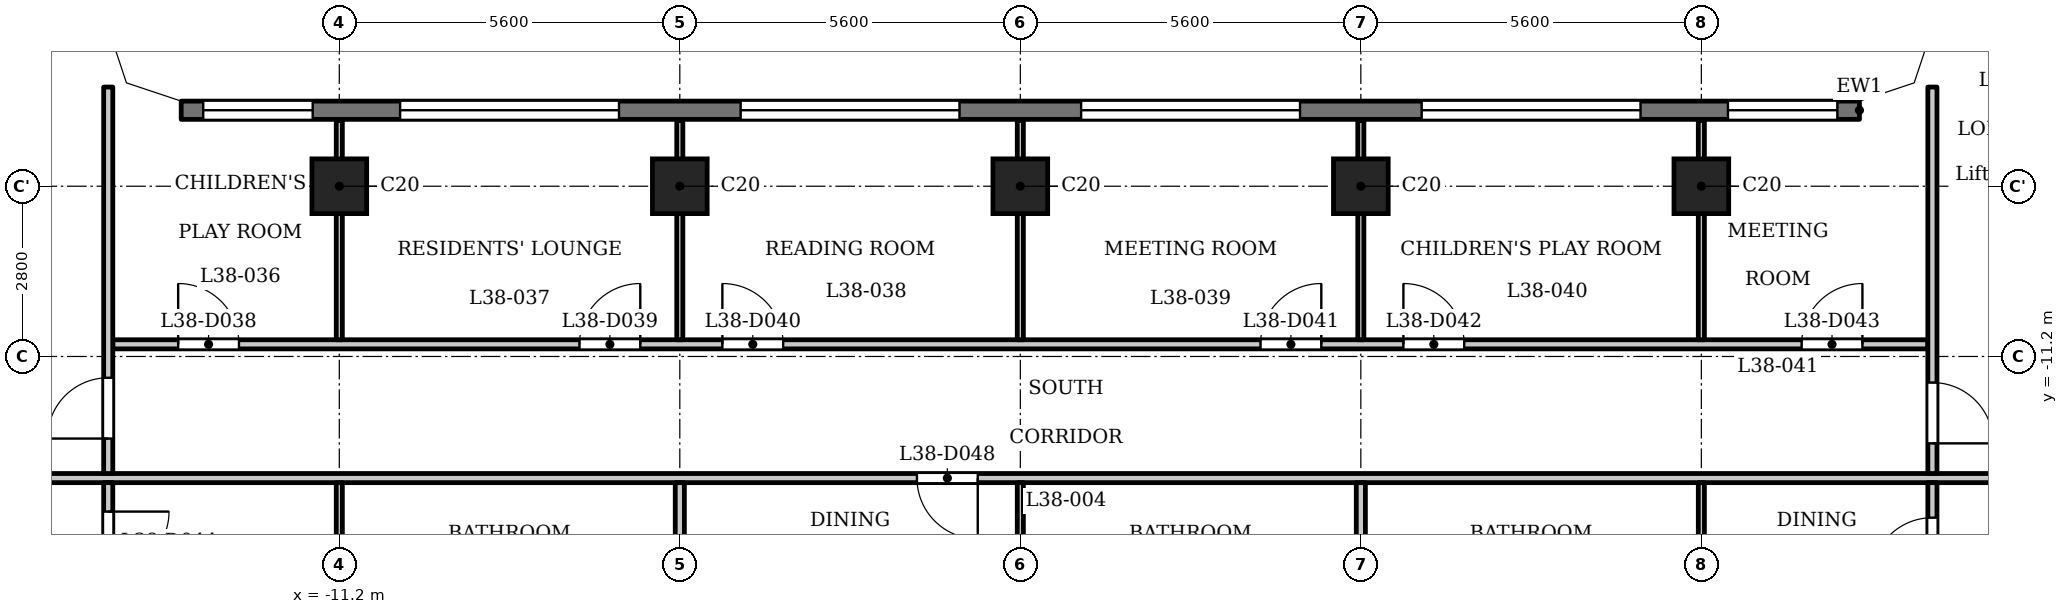
"""IFC4 building model, lengths in metres.
Left out: names, types, materials, properties, quantities, classifications, styles, units other than length and angle.
Written with IfcOpenShell. Run it as: python <this file> out.ifc"""

import sys

from ifc_helpers import new_model, si_unit, direction, frame, frame_2d, origin, origin_2d, place, context, subcontext, project, spatial, polyline, rectangle, outline, extrude, element, fill, save


model = new_model("IFC4")
c1 = context("Model", 3, precision=1e-05, world=origin(), true_north=direction((0.0, 1.0)))
c2 = subcontext(c1, "Body", "Model", "MODEL_VIEW")
j1 = project(units=[si_unit("LENGTHUNIT", "METRE"), si_unit("PLANEANGLEUNIT", "RADIAN")], contexts=[c1])
p1 = place(None, origin())
s1 = spatial("IfcSite", under=j1, at=p1, CompositionType="ELEMENT")
p2 = place(p1, origin())
s2 = spatial("IfcBuilding", under=s1, at=p2, CompositionType="ELEMENT")
p3 = place(p2, frame((0.0, 0.0, 150.1)))
s3 = spatial("IfcBuildingStorey", under=s2, at=p3, CompositionType="ELEMENT", Elevation=150.1)
for number, where, z_axis, x_axis in (
    (1, (-11.2, -8.4, 0.0), (0.0, 0.0, 1.0), (1.0, 0.0, 0.0)),
    (2, (-5.6, -8.4, 0.0), (0.0, 0.0, 1.0), (1.0, 0.0, 0.0)),
    (3, (0.0, -8.4, 0.0), (0.0, 0.0, 1.0), (1.0, 0.0, 0.0)),
    (4, (5.6, -8.4, 0.0), (0.0, 0.0, 1.0), (1.0, 0.0, 0.0)),
    (5, (11.2, -8.4, 0.0), (0.0, 0.0, 1.0), (1.0, 0.0, 0.0)),
):
    element("IfcColumn", number, at=place(p3, frame(where, z_axis=z_axis, x_axis=x_axis)), inside=s3, PredefinedType="COLUMN", context=c2, shape_type="SweptSolid", body=[
        extrude(rectangle(XDim=0.9, YDim=0.9, at=origin_2d()), origin(), (0.0, 0.0, 1.0), 3.5),
    ])
p4 = place(p3, frame((13.8, -7.15, 0.0), z_axis=(0.0, 0.0, 1.0), x_axis=(-1.0, 0.0, 0.0)))
e6 = element("IfcWall", 6, at=p4, inside=s3, PredefinedType="SOLIDWALL", context=c2, shape_type="SweptSolid", body=[
    extrude(rectangle(XDim=27.6, YDim=0.3, at=frame_2d((13.8, 0.0))), origin(), (0.0, 0.0, 1.0), 3.2),
])
p5 = place(p4, frame((0.363, 0.0, 0.9)))
e7 = element("IfcOpeningElement", 7, at=p5, cuts=e6, PredefinedType="OPENING", context=c2, shape_type="SweptSolid", body=[
    extrude(rectangle(XDim=1.8, YDim=1.25, at=frame_2d((0.9, 0.625))), frame((0.0, 0.16, 0.0), z_axis=(0.0, -1.0, 0.0), x_axis=(1.0, 0.0, 0.0)), (0.0, 0.0, 1.0), 0.32),
])
p6 = place(p4, frame((3.6, 0.0, 1.2)))
e8 = element("IfcOpeningElement", 8, at=p6, cuts=e6, PredefinedType="OPENING", context=c2, shape_type="SweptSolid", body=[
    extrude(rectangle(XDim=3.6, YDim=0.95, at=frame_2d((1.8, 0.475))), frame((0.0, 0.16, 0.0), z_axis=(0.0, -1.0, 0.0), x_axis=(1.0, 0.0, 0.0)), (0.0, 0.0, 1.0), 0.32),
])
p7 = place(p4, frame((9.2, 0.0, 1.2)))
e9 = element("IfcOpeningElement", 9, at=p7, cuts=e6, PredefinedType="OPENING", context=c2, shape_type="SweptSolid", body=[
    extrude(rectangle(XDim=3.6, YDim=0.95, at=frame_2d((1.8, 0.475))), frame((0.0, 0.16, 0.0), z_axis=(0.0, -1.0, 0.0), x_axis=(1.0, 0.0, 0.0)), (0.0, 0.0, 1.0), 0.32),
])
p8 = place(p4, frame((14.8, 0.0, 1.2)))
e10 = element("IfcOpeningElement", 10, at=p8, cuts=e6, PredefinedType="OPENING", context=c2, shape_type="SweptSolid", body=[
    extrude(rectangle(XDim=3.6, YDim=0.95, at=frame_2d((1.8, 0.475))), frame((0.0, 0.16, 0.0), z_axis=(0.0, -1.0, 0.0), x_axis=(1.0, 0.0, 0.0)), (0.0, 0.0, 1.0), 0.32),
])
p9 = place(p4, frame((20.4, 0.0, 1.2)))
e11 = element("IfcOpeningElement", 11, at=p9, cuts=e6, PredefinedType="OPENING", context=c2, shape_type="SweptSolid", body=[
    extrude(rectangle(XDim=3.6, YDim=0.95, at=frame_2d((1.8, 0.475))), frame((0.0, 0.16, 0.0), z_axis=(0.0, -1.0, 0.0), x_axis=(1.0, 0.0, 0.0)), (0.0, 0.0, 1.0), 0.32),
])
p10 = place(p4, frame((25.438, 0.0, 0.9)))
e12 = element("IfcOpeningElement", 12, at=p10, cuts=e6, PredefinedType="OPENING", context=c2, shape_type="SweptSolid", body=[
    extrude(rectangle(XDim=1.8, YDim=1.25, at=frame_2d((0.9, 0.625))), frame((0.0, 0.16, 0.0), z_axis=(0.0, -1.0, 0.0), x_axis=(1.0, 0.0, 0.0)), (0.0, 0.0, 1.0), 0.32),
])
p11 = place(p3, frame((-17.4, -13.2, 0.0), z_axis=(0.0, 0.0, 1.0), x_axis=(1.0, 0.0, 0.0)))
e13 = element("IfcWall", 13, at=p11, inside=s3, PredefinedType="PARTITIONING", context=c2, shape_type="SweptSolid", body=[
    extrude(rectangle(XDim=34.8, YDim=0.15, at=frame_2d((17.4, 0.0))), origin(), (0.0, 0.0, 1.0), 3.2),
])
p12 = place(p11, frame((0.15, 0.0, 0.0)))
e14 = element("IfcOpeningElement", 14, at=p12, cuts=e13, PredefinedType="OPENING", context=c2, shape_type="SweptSolid", body=[
    extrude(rectangle(XDim=1.0, YDim=2.1, at=frame_2d((0.5, 1.05))), frame((0.0, 0.085, 0.0), z_axis=(0.0, -1.0, 0.0), x_axis=(1.0, 0.0, 0.0)), (0.0, 0.0, 1.0), 0.17),
])
p13 = place(p11, frame((33.55, 0.0, 0.0)))
e15 = element("IfcOpeningElement", 15, at=p13, cuts=e13, PredefinedType="OPENING", context=c2, shape_type="SweptSolid", body=[
    extrude(rectangle(XDim=1.0, YDim=2.1, at=frame_2d((0.5, 1.05))), frame((0.0, 0.085, 0.0), z_axis=(0.0, -1.0, 0.0), x_axis=(1.0, 0.0, 0.0)), (0.0, 0.0, 1.0), 0.17),
])
p14 = place(p11, frame((15.7, 0.0, 0.0)))
e16 = element("IfcOpeningElement", 16, at=p14, cuts=e13, PredefinedType="OPENING", context=c2, shape_type="SweptSolid", body=[
    extrude(rectangle(XDim=1.0, YDim=2.1, at=frame_2d((0.5, 1.05))), frame((0.0, 0.085, 0.0), z_axis=(0.0, -1.0, 0.0), x_axis=(1.0, 0.0, 0.0)), (0.0, 0.0, 1.0), 0.17),
])
p15 = place(p3, frame((-14.925, -11.0, 0.0), z_axis=(0.0, 0.0, 1.0), x_axis=(1.0, 0.0, 0.0)))
e17 = element("IfcWall", 17, at=p15, inside=s3, PredefinedType="PARTITIONING", context=c2, shape_type="SweptSolid", body=[
    extrude(rectangle(XDim=29.85, YDim=0.15, at=frame_2d((14.925, 0.0))), origin(), (0.0, 0.0, 1.0), 3.2),
])
p16 = place(p15, frame((1.075, 0.0, 0.0)))
e18 = element("IfcOpeningElement", 18, at=p16, cuts=e17, PredefinedType="OPENING", context=c2, shape_type="SweptSolid", body=[
    extrude(rectangle(XDim=1.0, YDim=2.1, at=frame_2d((0.5, 1.05))), frame((0.0, 0.085, 0.0), z_axis=(0.0, -1.0, 0.0), x_axis=(1.0, 0.0, 0.0)), (0.0, 0.0, 1.0), 0.17),
])
p17 = place(p15, frame((7.675, 0.0, 0.0)))
e19 = element("IfcOpeningElement", 19, at=p17, cuts=e17, PredefinedType="OPENING", context=c2, shape_type="SweptSolid", body=[
    extrude(rectangle(XDim=1.0, YDim=2.1, at=frame_2d((0.5, 1.05))), frame((0.0, 0.085, 0.0), z_axis=(0.0, -1.0, 0.0), x_axis=(1.0, 0.0, 0.0)), (0.0, 0.0, 1.0), 0.17),
])
p18 = place(p15, frame((10.025, 0.0, 0.0)))
e20 = element("IfcOpeningElement", 20, at=p18, cuts=e17, PredefinedType="OPENING", context=c2, shape_type="SweptSolid", body=[
    extrude(rectangle(XDim=1.0, YDim=2.1, at=frame_2d((0.5, 1.05))), frame((0.0, 0.085, 0.0), z_axis=(0.0, -1.0, 0.0), x_axis=(1.0, 0.0, 0.0)), (0.0, 0.0, 1.0), 0.17),
])
p19 = place(p15, frame((18.875, 0.0, 0.0)))
e21 = element("IfcOpeningElement", 21, at=p19, cuts=e17, PredefinedType="OPENING", context=c2, shape_type="SweptSolid", body=[
    extrude(rectangle(XDim=1.0, YDim=2.1, at=frame_2d((0.5, 1.05))), frame((0.0, 0.085, 0.0), z_axis=(0.0, -1.0, 0.0), x_axis=(1.0, 0.0, 0.0)), (0.0, 0.0, 1.0), 0.17),
])
p20 = place(p15, frame((21.225, 0.0, 0.0)))
e22 = element("IfcOpeningElement", 22, at=p20, cuts=e17, PredefinedType="OPENING", context=c2, shape_type="SweptSolid", body=[
    extrude(rectangle(XDim=1.0, YDim=2.1, at=frame_2d((0.5, 1.05))), frame((0.0, 0.085, 0.0), z_axis=(0.0, -1.0, 0.0), x_axis=(1.0, 0.0, 0.0)), (0.0, 0.0, 1.0), 0.17),
])
p21 = place(p15, frame((27.774, 0.0, 0.0)))
e23 = element("IfcOpeningElement", 23, at=p21, cuts=e17, PredefinedType="OPENING", context=c2, shape_type="SweptSolid", body=[
    extrude(rectangle(XDim=1.0, YDim=2.1, at=frame_2d((0.5, 1.05))), frame((0.0, 0.085, 0.0), z_axis=(0.0, -1.0, 0.0), x_axis=(1.0, 0.0, 0.0)), (0.0, 0.0, 1.0), 0.17),
])
p22 = place(p3, frame((-15.0, -15.325, 0.0), z_axis=(0.0, 0.0, 1.0), x_axis=(0.0, 1.0, 0.0)))
e24 = element("IfcWall", 24, at=p22, inside=s3, PredefinedType="PARTITIONING", context=c2, shape_type="SweptSolid", body=[
    extrude(rectangle(XDim=2.05, YDim=0.15, at=frame_2d((1.025, 0.0))), origin(), (0.0, 0.0, 1.0), 3.2),
])
p23 = place(p22, frame((0.574, 0.0, 0.0)))
e25 = element("IfcOpeningElement", 25, at=p23, cuts=e24, PredefinedType="OPENING", context=c2, shape_type="SweptSolid", body=[
    extrude(rectangle(XDim=1.0, YDim=2.1, at=frame_2d((0.5, 1.05))), frame((0.0, 0.085, 0.0), z_axis=(0.0, -1.0, 0.0), x_axis=(1.0, 0.0, 0.0)), (0.0, 0.0, 1.0), 0.17),
])
p24 = place(p3, frame((-15.0, -13.125, 0.0), z_axis=(0.0, 0.0, 1.0), x_axis=(0.0, 1.0, 0.0)))
e26 = element("IfcWall", 26, at=p24, inside=s3, PredefinedType="PARTITIONING", context=c2, shape_type="SweptSolid", body=[
    extrude(rectangle(XDim=6.356, YDim=0.15, at=frame_2d((3.178, 0.0))), origin(), (0.0, 0.0, 1.0), 3.2),
])
p25 = place(p24, frame((0.575, 0.0, 0.0)))
e27 = element("IfcOpeningElement", 27, at=p25, cuts=e26, PredefinedType="OPENING", context=c2, shape_type="SweptSolid", body=[
    extrude(rectangle(XDim=1.0, YDim=2.1, at=frame_2d((0.5, 1.05))), frame((0.0, 0.085, 0.0), z_axis=(0.0, -1.0, 0.0), x_axis=(1.0, 0.0, 0.0)), (0.0, 0.0, 1.0), 0.17),
])
p26 = place(p3, frame((-11.2, -16.45, 0.0), z_axis=(0.0, 0.0, 1.0), x_axis=(0.0, 1.0, 0.0)))
e28 = element("IfcWall", 28, at=p26, inside=s3, PredefinedType="PARTITIONING", context=c2, shape_type="SweptSolid", body=[
    extrude(rectangle(XDim=3.175, YDim=0.1, at=frame_2d((1.587, 0.0))), origin(), (0.0, 0.0, 1.0), 3.2),
])
for number, where, z_axis, x_axis in (
    (29, (-11.2, -10.925, 0.0), (0.0, 0.0, 1.0), (0.0, 1.0, 0.0)),
    (30, (-5.6, -10.925, 0.0), (0.0, 0.0, 1.0), (0.0, 1.0, 0.0)),
):
    element("IfcWall", number, at=place(p3, frame(where, z_axis=z_axis, x_axis=x_axis)), inside=s3, PredefinedType="PARTITIONING", context=c2, shape_type="SweptSolid", body=[
        extrude(rectangle(XDim=3.605, YDim=0.1, at=frame_2d((1.802, 0.0))), origin(), (0.0, 0.0, 1.0), 3.2),
    ])
p27 = place(p3, frame((-5.6, -16.45, 0.0), z_axis=(0.0, 0.0, 1.0), x_axis=(0.0, 1.0, 0.0)))
e31 = element("IfcWall", 31, at=p27, inside=s3, PredefinedType="PARTITIONING", context=c2, shape_type="SweptSolid", body=[
    extrude(rectangle(XDim=3.175, YDim=0.15, at=frame_2d((1.587, 0.0))), origin(), (0.0, 0.0, 1.0), 3.2),
])
p28 = place(p3, frame((0.0, -16.45, 0.0), z_axis=(0.0, 0.0, 1.0), x_axis=(0.0, 1.0, 0.0)))
e32 = element("IfcWall", 32, at=p28, inside=s3, PredefinedType="PARTITIONING", context=c2, shape_type="SweptSolid", body=[
    extrude(rectangle(XDim=3.175, YDim=0.1, at=frame_2d((1.587, 0.0))), origin(), (0.0, 0.0, 1.0), 3.2),
])
for number, where, z_axis, x_axis in (
    (33, (0.0, -10.925, 0.0), (0.0, 0.0, 1.0), (0.0, 1.0, 0.0)),
    (34, (5.6, -10.925, 0.0), (0.0, 0.0, 1.0), (0.0, 1.0, 0.0)),
):
    element("IfcWall", number, at=place(p3, frame(where, z_axis=z_axis, x_axis=x_axis)), inside=s3, PredefinedType="PARTITIONING", context=c2, shape_type="SweptSolid", body=[
        extrude(rectangle(XDim=3.605, YDim=0.1, at=frame_2d((1.802, 0.0))), origin(), (0.0, 0.0, 1.0), 3.2),
    ])
p29 = place(p3, frame((5.6, -16.45, 0.0), z_axis=(0.0, 0.0, 1.0), x_axis=(0.0, 1.0, 0.0)))
e35 = element("IfcWall", 35, at=p29, inside=s3, PredefinedType="PARTITIONING", context=c2, shape_type="SweptSolid", body=[
    extrude(rectangle(XDim=3.175, YDim=0.15, at=frame_2d((1.587, 0.0))), origin(), (0.0, 0.0, 1.0), 3.2),
])
p30 = place(p3, frame((11.2, -16.45, 0.0), z_axis=(0.0, 0.0, 1.0), x_axis=(0.0, 1.0, 0.0)))
e36 = element("IfcWall", 36, at=p30, inside=s3, PredefinedType="PARTITIONING", context=c2, shape_type="SweptSolid", body=[
    extrude(rectangle(XDim=3.175, YDim=0.1, at=frame_2d((1.587, 0.0))), origin(), (0.0, 0.0, 1.0), 3.2),
])
p31 = place(p3, frame((11.2, -10.925, 0.0), z_axis=(0.0, 0.0, 1.0), x_axis=(0.0, 1.0, 0.0)))
e37 = element("IfcWall", 37, at=p31, inside=s3, PredefinedType="PARTITIONING", context=c2, shape_type="SweptSolid", body=[
    extrude(rectangle(XDim=3.605, YDim=0.1, at=frame_2d((1.802, 0.0))), origin(), (0.0, 0.0, 1.0), 3.2),
])
p32 = place(p3, frame((15.0, -15.325, 0.0), z_axis=(0.0, 0.0, 1.0), x_axis=(0.0, 1.0, 0.0)))
e38 = element("IfcWall", 38, at=p32, inside=s3, PredefinedType="PARTITIONING", context=c2, shape_type="SweptSolid", body=[
    extrude(rectangle(XDim=2.05, YDim=0.15, at=frame_2d((1.025, 0.0))), origin(), (0.0, 0.0, 1.0), 3.2),
])
p33 = place(p32, frame((0.474, 0.0, 0.0)))
e39 = element("IfcOpeningElement", 39, at=p33, cuts=e38, PredefinedType="OPENING", context=c2, shape_type="SweptSolid", body=[
    extrude(rectangle(XDim=1.0, YDim=2.1, at=frame_2d((0.5, 1.05))), frame((0.0, 0.085, 0.0), z_axis=(0.0, -1.0, 0.0), x_axis=(1.0, 0.0, 0.0)), (0.0, 0.0, 1.0), 0.17),
])
p34 = place(p3, frame((15.0, -13.125, 0.0), z_axis=(0.0, 0.0, 1.0), x_axis=(0.0, 1.0, 0.0)))
e40 = element("IfcWall", 40, at=p34, inside=s3, PredefinedType="PARTITIONING", context=c2, shape_type="SweptSolid", body=[
    extrude(rectangle(XDim=6.356, YDim=0.15, at=frame_2d((3.178, 0.0))), origin(), (0.0, 0.0, 1.0), 3.2),
])
p35 = place(p34, frame((0.496, 0.0, 0.0)))
e41 = element("IfcOpeningElement", 41, at=p35, cuts=e40, PredefinedType="OPENING", context=c2, shape_type="SweptSolid", body=[
    extrude(rectangle(XDim=1.0, YDim=2.1, at=frame_2d((0.5, 1.05))), frame((0.0, 0.085, 0.0), z_axis=(0.0, -1.0, 0.0), x_axis=(1.0, 0.0, 0.0)), (0.0, 0.0, 1.0), 0.17),
])
p36 = place(p3, origin())
e42 = element("IfcWall", 42, at=p36, inside=s3, PredefinedType="SOLIDWALL", context=c2, shape_type="SweptSolid", body=[
    extrude(outline(polyline([(14.937, -6.937), (15.3, -5.849), (15.3, -5.8), (15.0, -5.8), (14.7, -6.7), (13.8, -7.0), (13.8, -7.3), (13.849, -7.3), (14.937, -6.937)])), origin(), (0.0, 0.0, 1.0), 3.2),
])
e43 = element("IfcWall", 43, at=p36, inside=s3, PredefinedType="SOLIDWALL", context=c2, shape_type="SweptSolid", body=[
    extrude(outline(polyline([(-14.937, -6.937), (-13.849, -7.3), (-13.8, -7.3), (-13.8, -7.0), (-14.7, -6.7), (-15.0, -5.8), (-15.3, -5.8), (-15.3, -5.849), (-14.937, -6.937)])), origin(), (0.0, 0.0, 1.0), 3.2),
])
p37 = place(p25, origin())
e44 = element("IfcDoor", 44, at=p37, inside=s3, OperationType="SINGLE_SWING_RIGHT", PredefinedType="DOOR", context=c2, shape_type="SweptSolid", body=[
    extrude(rectangle(XDim=1.0, YDim=2.1, at=frame_2d((0.5, 1.05))), frame((0.0, 0.025, 0.0), z_axis=(0.0, -1.0, 0.0), x_axis=(1.0, 0.0, 0.0)), (0.0, 0.0, 1.0), 0.05),
])
fill(e27, e44)
p38 = place(p35, origin())
e45 = element("IfcDoor", 45, at=p38, inside=s3, OperationType="SINGLE_SWING_LEFT", PredefinedType="DOOR", context=c2, shape_type="SweptSolid", body=[
    extrude(rectangle(XDim=1.0, YDim=2.1, at=frame_2d((0.5, 1.05))), frame((0.0, 0.025, 0.0), z_axis=(0.0, -1.0, 0.0), x_axis=(1.0, 0.0, 0.0)), (0.0, 0.0, 1.0), 0.05),
])
fill(e41, e45)
p39 = place(p16, origin())
e46 = element("IfcDoor", 46, at=p39, inside=s3, OperationType="SINGLE_SWING_RIGHT", PredefinedType="DOOR", context=c2, shape_type="SweptSolid", body=[
    extrude(rectangle(XDim=1.0, YDim=2.1, at=frame_2d((0.5, 1.05))), frame((0.0, 0.025, 0.0), z_axis=(0.0, -1.0, 0.0), x_axis=(1.0, 0.0, 0.0)), (0.0, 0.0, 1.0), 0.05),
])
fill(e18, e46)
p40 = place(p17, origin())
e47 = element("IfcDoor", 47, at=p40, inside=s3, OperationType="SINGLE_SWING_LEFT", PredefinedType="DOOR", context=c2, shape_type="SweptSolid", body=[
    extrude(rectangle(XDim=1.0, YDim=2.1, at=frame_2d((0.5, 1.05))), frame((0.0, 0.025, 0.0), z_axis=(0.0, -1.0, 0.0), x_axis=(1.0, 0.0, 0.0)), (0.0, 0.0, 1.0), 0.05),
])
fill(e19, e47)
p41 = place(p18, origin())
e48 = element("IfcDoor", 48, at=p41, inside=s3, OperationType="SINGLE_SWING_RIGHT", PredefinedType="DOOR", context=c2, shape_type="SweptSolid", body=[
    extrude(rectangle(XDim=1.0, YDim=2.1, at=frame_2d((0.5, 1.05))), frame((0.0, 0.025, 0.0), z_axis=(0.0, -1.0, 0.0), x_axis=(1.0, 0.0, 0.0)), (0.0, 0.0, 1.0), 0.05),
])
fill(e20, e48)
p42 = place(p19, origin())
e49 = element("IfcDoor", 49, at=p42, inside=s3, OperationType="SINGLE_SWING_LEFT", PredefinedType="DOOR", context=c2, shape_type="SweptSolid", body=[
    extrude(rectangle(XDim=1.0, YDim=2.1, at=frame_2d((0.5, 1.05))), frame((0.0, 0.025, 0.0), z_axis=(0.0, -1.0, 0.0), x_axis=(1.0, 0.0, 0.0)), (0.0, 0.0, 1.0), 0.05),
])
fill(e21, e49)
p43 = place(p20, origin())
e50 = element("IfcDoor", 50, at=p43, inside=s3, OperationType="SINGLE_SWING_RIGHT", PredefinedType="DOOR", context=c2, shape_type="SweptSolid", body=[
    extrude(rectangle(XDim=1.0, YDim=2.1, at=frame_2d((0.5, 1.05))), frame((0.0, 0.025, 0.0), z_axis=(0.0, -1.0, 0.0), x_axis=(1.0, 0.0, 0.0)), (0.0, 0.0, 1.0), 0.05),
])
fill(e22, e50)
p44 = place(p21, origin())
e51 = element("IfcDoor", 51, at=p44, inside=s3, OperationType="SINGLE_SWING_LEFT", PredefinedType="DOOR", context=c2, shape_type="SweptSolid", body=[
    extrude(rectangle(XDim=1.0, YDim=2.1, at=frame_2d((0.5, 1.05))), frame((0.0, 0.025, 0.0), z_axis=(0.0, -1.0, 0.0), x_axis=(1.0, 0.0, 0.0)), (0.0, 0.0, 1.0), 0.05),
])
fill(e23, e51)
p45 = place(p23, origin())
e52 = element("IfcDoor", 52, at=p45, inside=s3, OperationType="SINGLE_SWING_RIGHT", PredefinedType="DOOR", context=c2, shape_type="SweptSolid", body=[
    extrude(rectangle(XDim=1.0, YDim=2.1, at=frame_2d((0.5, 1.05))), frame((0.0, 0.025, 0.0), z_axis=(0.0, -1.0, 0.0), x_axis=(1.0, 0.0, 0.0)), (0.0, 0.0, 1.0), 0.05),
])
fill(e25, e52)
p46 = place(p14, origin())
e53 = element("IfcDoor", 53, at=p46, inside=s3, OperationType="SINGLE_SWING_RIGHT", PredefinedType="DOOR", context=c2, shape_type="SweptSolid", body=[
    extrude(rectangle(XDim=1.0, YDim=2.1, at=frame_2d((0.5, 1.05))), frame((0.0, 0.025, 0.0), z_axis=(0.0, -1.0, 0.0), x_axis=(1.0, 0.0, 0.0)), (0.0, 0.0, 1.0), 0.05),
])
fill(e16, e53)
p47 = place(p33, origin())
e54 = element("IfcDoor", 54, at=p47, inside=s3, OperationType="SINGLE_SWING_RIGHT", PredefinedType="DOOR", context=c2, shape_type="SweptSolid", body=[
    extrude(rectangle(XDim=1.0, YDim=2.1, at=frame_2d((0.5, 1.05))), frame((0.0, 0.025, 0.0), z_axis=(0.0, -1.0, 0.0), x_axis=(1.0, 0.0, 0.0)), (0.0, 0.0, 1.0), 0.05),
])
fill(e39, e54)
p48 = place(p5, origin())
e55 = element("IfcWindow", 55, at=p48, inside=s3, PartitioningType="SINGLE_PANEL", PredefinedType="WINDOW", context=c2, shape_type="SweptSolid", body=[
    extrude(rectangle(XDim=1.8, YDim=1.25, at=frame_2d((0.9, 0.625))), frame((0.0, 0.03, 0.0), z_axis=(0.0, -1.0, 0.0), x_axis=(1.0, 0.0, 0.0)), (0.0, 0.0, 1.0), 0.06),
])
fill(e7, e55)
p49 = place(p6, origin())
e56 = element("IfcWindow", 56, at=p49, inside=s3, PartitioningType="SINGLE_PANEL", PredefinedType="WINDOW", context=c2, shape_type="SweptSolid", body=[
    extrude(rectangle(XDim=3.6, YDim=0.95, at=frame_2d((1.8, 0.475))), frame((0.0, 0.03, 0.0), z_axis=(0.0, -1.0, 0.0), x_axis=(1.0, 0.0, 0.0)), (0.0, 0.0, 1.0), 0.06),
])
fill(e8, e56)
p50 = place(p7, origin())
e57 = element("IfcWindow", 57, at=p50, inside=s3, PartitioningType="SINGLE_PANEL", PredefinedType="WINDOW", context=c2, shape_type="SweptSolid", body=[
    extrude(rectangle(XDim=3.6, YDim=0.95, at=frame_2d((1.8, 0.475))), frame((0.0, 0.03, 0.0), z_axis=(0.0, -1.0, 0.0), x_axis=(1.0, 0.0, 0.0)), (0.0, 0.0, 1.0), 0.06),
])
fill(e9, e57)
p51 = place(p8, origin())
e58 = element("IfcWindow", 58, at=p51, inside=s3, PartitioningType="SINGLE_PANEL", PredefinedType="WINDOW", context=c2, shape_type="SweptSolid", body=[
    extrude(rectangle(XDim=3.6, YDim=0.95, at=frame_2d((1.8, 0.475))), frame((0.0, 0.03, 0.0), z_axis=(0.0, -1.0, 0.0), x_axis=(1.0, 0.0, 0.0)), (0.0, 0.0, 1.0), 0.06),
])
fill(e10, e58)
p52 = place(p9, origin())
e59 = element("IfcWindow", 59, at=p52, inside=s3, PartitioningType="SINGLE_PANEL", PredefinedType="WINDOW", context=c2, shape_type="SweptSolid", body=[
    extrude(rectangle(XDim=3.6, YDim=0.95, at=frame_2d((1.8, 0.475))), frame((0.0, 0.03, 0.0), z_axis=(0.0, -1.0, 0.0), x_axis=(1.0, 0.0, 0.0)), (0.0, 0.0, 1.0), 0.06),
])
fill(e11, e59)
p53 = place(p10, origin())
e60 = element("IfcWindow", 60, at=p53, inside=s3, PartitioningType="SINGLE_PANEL", PredefinedType="WINDOW", context=c2, shape_type="SweptSolid", body=[
    extrude(rectangle(XDim=1.8, YDim=1.25, at=frame_2d((0.9, 0.625))), frame((0.0, 0.03, 0.0), z_axis=(0.0, -1.0, 0.0), x_axis=(1.0, 0.0, 0.0)), (0.0, 0.0, 1.0), 0.06),
])
fill(e12, e60)
save(model, sys.argv[1])
